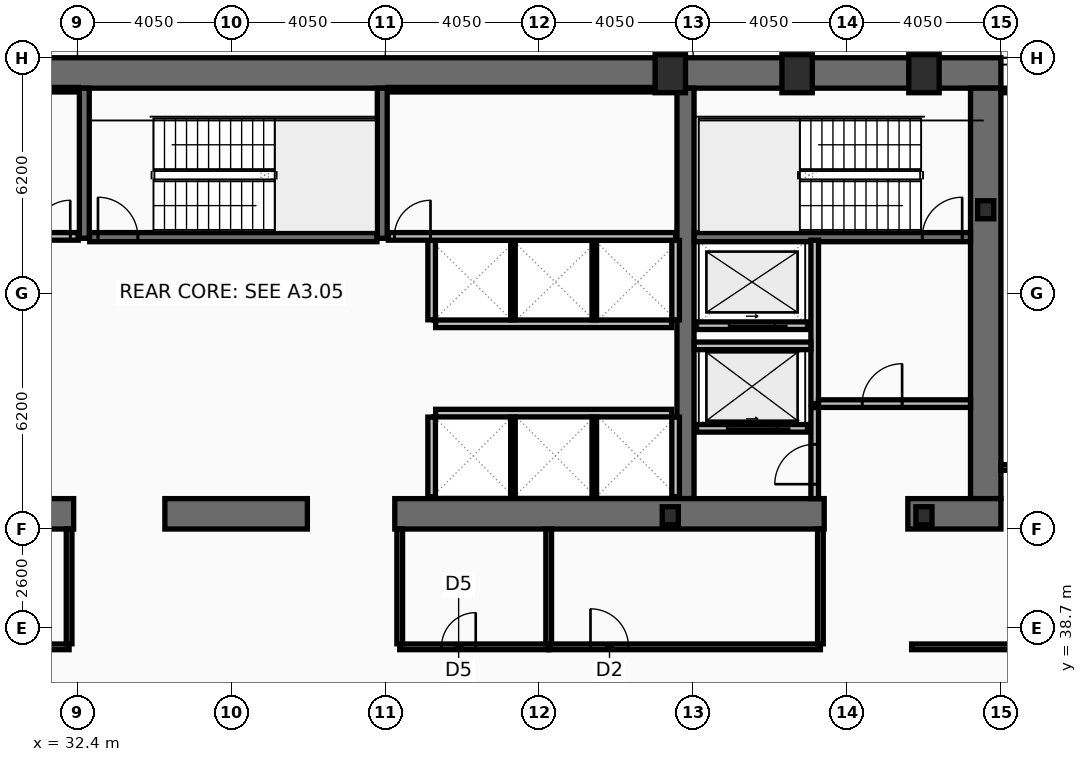
"""IFC4 building model, lengths in metres.
Left out: names, types, materials, properties, quantities, classifications, styles, units other than length and angle.
Written with IfcOpenShell. Run it as: python <this file> out.ifc"""

import sys

from ifc_helpers import new_model, si_unit, direction, frame, frame_2d, origin, origin_2d, place, context, subcontext, project, spatial, rectangle, hollow_rectangle, i_section, extrude, element, fill, save


model = new_model("IFC4")
c1 = context("Model", 3, precision=1e-05, world=origin(), true_north=direction((0.0, 1.0)))
c2 = subcontext(c1, "Body", "Model", "MODEL_VIEW")
j1 = project(units=[si_unit("LENGTHUNIT", "METRE"), si_unit("PLANEANGLEUNIT", "RADIAN")], contexts=[c1])
p1 = place(None, origin())
s1 = spatial("IfcSite", under=j1, at=p1, CompositionType="ELEMENT")
p2 = place(p1, origin())
s2 = spatial("IfcBuilding", under=s1, at=p2, CompositionType="ELEMENT")
p3 = place(p2, frame((0.0, 0.0, 33.8)))
s3 = spatial("IfcBuildingStorey", under=s2, at=p3, CompositionType="ELEMENT", Elevation=33.8)
p4 = place(p3, frame((16.2, 53.3, 0.0), z_axis=(0.0, 0.0, 1.0), x_axis=(1.0, 0.0, 0.0)))
e1 = element("IfcWall", 1, at=p4, inside=s3, PredefinedType="SHEAR", context=c2, shape_type="SweptSolid", body=[
    extrude(rectangle(XDim=40.5, YDim=0.8, at=frame_2d((20.25, 0.0))), origin(), (0.0, 0.0, 1.0), 3.82),
])
p5 = place(p3, frame((56.3, 52.9, 0.0), z_axis=(0.0, 0.0, 1.0), x_axis=(0.0, -1.0, 0.0)))
e2 = element("IfcWall", 2, at=p5, inside=s3, PredefinedType="SHEAR", context=c2, shape_type="SweptSolid", body=[
    extrude(rectangle(XDim=10.8, YDim=0.8, at=frame_2d((5.4, 0.0))), origin(), (0.0, 0.0, 1.0), 3.82),
])
p6 = place(p3, frame((48.4, 42.1, 0.0), z_axis=(0.0, 0.0, 1.0), x_axis=(0.0, 1.0, 0.0)))
e3 = element("IfcWall", 3, at=p6, inside=s3, PredefinedType="SHEAR", context=c2, shape_type="SweptSolid", body=[
    extrude(rectangle(XDim=10.8, YDim=0.45, at=frame_2d((5.4, 0.0))), origin(), (0.0, 0.0, 1.0), 3.82),
])
p7 = place(p3, frame((32.3, 41.7, 0.0), z_axis=(0.0, 0.0, 1.0), x_axis=(-1.0, 0.0, 0.0)))
e4 = element("IfcWall", 4, at=p7, inside=s3, PredefinedType="SHEAR", context=c2, shape_type="SweptSolid", body=[
    extrude(rectangle(XDim=11.45, YDim=0.8, at=frame_2d((5.725, 0.0))), origin(), (0.0, 0.0, 1.0), 3.82),
])
p8 = place(p3, frame((38.45, 41.7, 0.0), z_axis=(0.0, 0.0, 1.0), x_axis=(-1.0, 0.0, 0.0)))
e5 = element("IfcWall", 5, at=p8, inside=s3, PredefinedType="SHEAR", context=c2, shape_type="SweptSolid", body=[
    extrude(rectangle(XDim=3.75, YDim=0.8, at=frame_2d((1.875, 0.0))), origin(), (0.0, 0.0, 1.0), 3.82),
])
p9 = place(p3, frame((52.05, 41.7, 0.0), z_axis=(0.0, 0.0, 1.0), x_axis=(-1.0, 0.0, 0.0)))
e6 = element("IfcWall", 6, at=p9, inside=s3, PredefinedType="SHEAR", context=c2, shape_type="SweptSolid", body=[
    extrude(rectangle(XDim=11.3, YDim=0.8, at=frame_2d((5.65, 0.0))), origin(), (0.0, 0.0, 1.0), 3.82),
])
p10 = place(p3, frame((56.7, 41.7, 0.0), z_axis=(0.0, 0.0, 1.0), x_axis=(-1.0, 0.0, 0.0)))
e7 = element("IfcWall", 7, at=p10, inside=s3, PredefinedType="SHEAR", context=c2, shape_type="SweptSolid", body=[
    extrude(rectangle(XDim=2.45, YDim=0.8, at=frame_2d((1.225, 0.0))), origin(), (0.0, 0.0, 1.0), 3.82),
])
for number, where, z_axis, x_axis in (
    (8, (32.58, 48.95, 0.0), (0.0, 0.0, 1.0), (0.0, 1.0, 0.0)),
    (9, (40.42, 48.95, 0.0), (0.0, 0.0, 1.0), (0.0, 1.0, 0.0)),
):
    element("IfcWall", number, at=place(p3, frame(where, z_axis=z_axis, x_axis=x_axis)), inside=s3, PredefinedType="SHEAR", context=c2, shape_type="SweptSolid", body=[
        extrude(rectangle(XDim=3.95, YDim=0.26, at=frame_2d((1.975, 0.0))), origin(), (0.0, 0.0, 1.0), 3.82),
    ])
p11 = place(p3, frame((48.63, 48.98, 0.0), z_axis=(0.0, 0.0, 1.0), x_axis=(1.0, 0.0, 0.0)))
e10 = element("IfcWall", 10, at=p11, inside=s3, PredefinedType="SHEAR", context=c2, shape_type="SweptSolid", body=[
    extrude(rectangle(XDim=7.27, YDim=0.24, at=frame_2d((3.635, 0.0))), origin(), (0.0, 0.0, 1.0), 3.82),
])
p12 = place(p11, frame((6.0, 0.0, 0.0)))
e11 = element("IfcOpeningElement", 11, at=p12, cuts=e10, PredefinedType="OPENING", context=c2, shape_type="SweptSolid", body=[
    extrude(rectangle(XDim=1.05, YDim=2.15, at=frame_2d((0.525, 1.075))), frame((0.0, 0.13, 0.0), z_axis=(0.0, -1.0, 0.0), x_axis=(1.0, 0.0, 0.0)), (0.0, 0.0, 1.0), 0.26),
])
p13 = place(p3, frame((32.72, 48.98, 0.0), z_axis=(0.0, 0.0, 1.0), x_axis=(1.0, 0.0, 0.0)))
e12 = element("IfcWall", 12, at=p13, inside=s3, PredefinedType="SHEAR", context=c2, shape_type="SweptSolid", body=[
    extrude(rectangle(XDim=7.56, YDim=0.24, at=frame_2d((3.78, 0.0))), origin(), (0.0, 0.0, 1.0), 3.82),
])
p14 = place(p13, frame((0.22, 0.0, 0.0)))
e13 = element("IfcOpeningElement", 13, at=p14, cuts=e12, PredefinedType="OPENING", context=c2, shape_type="SweptSolid", body=[
    extrude(rectangle(XDim=1.05, YDim=2.15, at=frame_2d((0.525, 1.075))), frame((0.0, 0.13, 0.0), z_axis=(0.0, -1.0, 0.0), x_axis=(1.0, 0.0, 0.0)), (0.0, 0.0, 1.0), 0.26),
])
for number, where, z_axis, x_axis in (
    (14, (48.0, 53.28, 0.0), (0.0, 0.0, 1.0), (1.0, 0.0, 0.0)),
    (15, (51.337, 53.28, 0.0), (0.0, 0.0, 1.0), (1.0, 0.0, 0.0)),
    (16, (54.675, 53.28, 0.0), (0.0, 0.0, 1.0), (1.0, 0.0, 0.0)),
):
    element("IfcColumn", number, at=place(p3, frame(where, z_axis=z_axis, x_axis=x_axis)), inside=s3, PredefinedType="COLUMN", context=c2, shape_type="SweptSolid", body=[
        extrude(hollow_rectangle(XDim=0.8, YDim=1.0, WallThickness=0.055, at=origin_2d()), origin(), (0.0, 0.0, 1.0), 4.0),
    ])
for number, where, z_axis, x_axis in (
    (17, (56.3, 49.7, 0.0), (0.0, 0.0, 1.0), (1.0, 0.0, 0.0)),
    (18, (48.0, 41.65, 0.0), (0.0, 0.0, 1.0), (1.0, 0.0, 0.0)),
    (19, (54.675, 41.65, 0.0), (0.0, 0.0, 1.0), (1.0, 0.0, 0.0)),
):
    element("IfcColumn", number, at=place(p3, frame(where, z_axis=z_axis, x_axis=x_axis)), inside=s3, PredefinedType="COLUMN", context=c2, shape_type="SweptSolid", body=[
        extrude(i_section(OverallWidth=0.424, OverallDepth=0.474, WebThickness=0.048, FlangeThickness=0.077, at=origin_2d()), origin(), (0.0, 0.0, 1.0), 4.0),
    ])
p15 = place(p3, frame((51.61, 43.95, 0.0), z_axis=(0.0, 0.0, 1.0), x_axis=(-1.0, 0.0, 0.0)))
e20 = element("IfcWall", 20, at=p15, inside=s3, PredefinedType="PARTITIONING", context=c2, shape_type="SweptSolid", body=[
    extrude(rectangle(XDim=2.92, YDim=0.2, at=frame_2d((1.46, 0.0))), origin(), (0.0, 0.0, 1.0), 3.82),
])
p16 = place(p15, frame((0.81, 0.0, 0.0)))
e21 = element("IfcOpeningElement", 21, at=p16, cuts=e20, PredefinedType="OPENING", context=c2, shape_type="SweptSolid", body=[
    extrude(rectangle(XDim=1.3, YDim=2.18, at=frame_2d((0.65, 1.09))), frame((0.0, 0.11, 0.0), z_axis=(0.0, -1.0, 0.0), x_axis=(1.0, 0.0, 0.0)), (0.0, 0.0, 1.0), 0.22),
])
p17 = place(p3, frame((51.61, 46.65, 0.0), z_axis=(0.0, 0.0, 1.0), x_axis=(-1.0, 0.0, 0.0)))
e22 = element("IfcWall", 22, at=p17, inside=s3, PredefinedType="PARTITIONING", context=c2, shape_type="SweptSolid", body=[
    extrude(rectangle(XDim=2.92, YDim=0.2, at=frame_2d((1.46, 0.0))), origin(), (0.0, 0.0, 1.0), 3.82),
])
p18 = place(p17, frame((0.86, 0.0, 0.0)))
e23 = element("IfcOpeningElement", 23, at=p18, cuts=e22, PredefinedType="OPENING", context=c2, shape_type="SweptSolid", body=[
    extrude(rectangle(XDim=1.2, YDim=2.18, at=frame_2d((0.6, 1.09))), frame((0.0, 0.11, 0.0), z_axis=(0.0, -1.0, 0.0), x_axis=(1.0, 0.0, 0.0)), (0.0, 0.0, 1.0), 0.22),
])
p19 = place(p3, frame((51.8, 44.6, 0.0), z_axis=(0.0, 0.0, 1.0), x_axis=(0.0, 1.0, 0.0)))
e24 = element("IfcWall", 24, at=p19, inside=s3, PredefinedType="PARTITIONING", context=c2, shape_type="SweptSolid", body=[
    extrude(rectangle(XDim=4.3, YDim=0.2, at=frame_2d((2.15, 0.0))), origin(), (0.0, 0.0, 1.0), 3.82),
])
p20 = place(p3, frame((51.9, 44.6, 0.0), z_axis=(0.0, 0.0, 1.0), x_axis=(1.0, 0.0, 0.0)))
e25 = element("IfcWall", 25, at=p20, inside=s3, PredefinedType="PARTITIONING", context=c2, shape_type="SweptSolid", body=[
    extrude(rectangle(XDim=4.0, YDim=0.2, at=frame_2d((2.0, 0.0))), origin(), (0.0, 0.0, 1.0), 3.82),
])
p21 = place(p20, frame((1.15, 0.0, 0.0)))
e26 = element("IfcOpeningElement", 26, at=p21, cuts=e25, PredefinedType="OPENING", context=c2, shape_type="SweptSolid", body=[
    extrude(rectangle(XDim=1.05, YDim=2.15, at=frame_2d((0.525, 1.075))), frame((0.0, 0.11, 0.0), z_axis=(0.0, -1.0, 0.0), x_axis=(1.0, 0.0, 0.0)), (0.0, 0.0, 1.0), 0.22),
])
p22 = place(p3, frame((48.63, 46.12, 0.0), z_axis=(0.0, 0.0, 1.0), x_axis=(1.0, 0.0, 0.0)))
e27 = element("IfcWall", 27, at=p22, inside=s3, PredefinedType="PARTITIONING", context=c2, shape_type="SweptSolid", body=[
    extrude(rectangle(XDim=3.07, YDim=0.2, at=frame_2d((1.535, 0.0))), origin(), (0.0, 0.0, 1.0), 3.82),
])
p23 = place(p3, frame((51.8, 42.1, 0.0), z_axis=(0.0, 0.0, 1.0), x_axis=(0.0, 1.0, 0.0)))
e28 = element("IfcWall", 28, at=p23, inside=s3, PredefinedType="PARTITIONING", context=c2, shape_type="SweptSolid", body=[
    extrude(rectangle(XDim=2.395, YDim=0.2, at=frame_2d((1.198, 0.0))), origin(), (0.0, 0.0, 1.0), 3.82),
])
p24 = place(p23, frame((0.38, 0.0, 0.0)))
e29 = element("IfcOpeningElement", 29, at=p24, cuts=e28, PredefinedType="OPENING", context=c2, shape_type="SweptSolid", body=[
    extrude(rectangle(XDim=1.05, YDim=2.15, at=frame_2d((0.525, 1.075))), frame((0.0, 0.11, 0.0), z_axis=(0.0, -1.0, 0.0), x_axis=(1.0, 0.0, 0.0)), (0.0, 0.0, 1.0), 0.22),
])
p25 = place(p3, frame((41.825, 46.7, 0.0), z_axis=(0.0, 0.0, 1.0), x_axis=(1.0, 0.0, 0.0)))
e30 = element("IfcWall", 30, at=p25, inside=s3, PredefinedType="PARTITIONING", context=c2, shape_type="SweptSolid", body=[
    extrude(rectangle(XDim=6.21, YDim=0.2, at=frame_2d((3.105, 0.0))), origin(), (0.0, 0.0, 1.0), 3.82),
])
for number, where, z_axis, x_axis in (
    (31, (41.72, 46.805, 0.0), (0.0, 0.0, 1.0), (0.0, 1.0, 0.0)),
    (32, (48.14, 46.805, 0.0), (0.0, 0.0, 1.0), (0.0, 1.0, 0.0)),
):
    element("IfcWall", number, at=place(p3, frame(where, z_axis=z_axis, x_axis=x_axis)), inside=s3, PredefinedType="PARTITIONING", context=c2, shape_type="SweptSolid", body=[
        extrude(rectangle(XDim=2.09, YDim=0.2, at=frame_2d((1.045, 0.0))), origin(), (0.0, 0.0, 1.0), 3.82),
    ])
for number, where, z_axis, x_axis in (
    (33, (43.86, 46.805, 0.0), (0.0, 0.0, 1.0), (0.0, 1.0, 0.0)),
    (34, (46.0, 46.805, 0.0), (0.0, 0.0, 1.0), (0.0, 1.0, 0.0)),
):
    element("IfcWall", number, at=place(p3, frame(where, z_axis=z_axis, x_axis=x_axis)), inside=s3, PredefinedType="PARTITIONING", context=c2, shape_type="SweptSolid", body=[
        extrude(rectangle(XDim=2.09, YDim=0.12, at=frame_2d((1.045, 0.0))), origin(), (0.0, 0.0, 1.0), 3.82),
    ])
p26 = place(p3, frame((41.825, 44.35, 0.0), z_axis=(0.0, 0.0, 1.0), x_axis=(1.0, 0.0, 0.0)))
e35 = element("IfcWall", 35, at=p26, inside=s3, PredefinedType="PARTITIONING", context=c2, shape_type="SweptSolid", body=[
    extrude(rectangle(XDim=6.21, YDim=0.2, at=frame_2d((3.105, 0.0))), origin(), (0.0, 0.0, 1.0), 3.82),
])
for number, where, z_axis, x_axis in (
    (36, (41.72, 42.15, 0.0), (0.0, 0.0, 1.0), (0.0, 1.0, 0.0)),
    (37, (48.14, 42.15, 0.0), (0.0, 0.0, 1.0), (0.0, 1.0, 0.0)),
):
    element("IfcWall", number, at=place(p3, frame(where, z_axis=z_axis, x_axis=x_axis)), inside=s3, PredefinedType="PARTITIONING", context=c2, shape_type="SweptSolid", body=[
        extrude(rectangle(XDim=2.095, YDim=0.2, at=frame_2d((1.048, 0.0))), origin(), (0.0, 0.0, 1.0), 3.82),
    ])
for number, where, z_axis, x_axis in (
    (38, (43.86, 42.15, 0.0), (0.0, 0.0, 1.0), (0.0, 1.0, 0.0)),
    (39, (46.0, 42.15, 0.0), (0.0, 0.0, 1.0), (0.0, 1.0, 0.0)),
):
    element("IfcWall", number, at=place(p3, frame(where, z_axis=z_axis, x_axis=x_axis)), inside=s3, PredefinedType="PARTITIONING", context=c2, shape_type="SweptSolid", body=[
        extrude(rectangle(XDim=2.095, YDim=0.12, at=frame_2d((1.048, 0.0))), origin(), (0.0, 0.0, 1.0), 3.82),
    ])
p27 = place(p3, frame((24.7, 52.86, 0.0), z_axis=(0.0, 0.0, 1.0), x_axis=(1.0, 0.0, 0.0)))
e40 = element("IfcWall", 40, at=p27, inside=s3, PredefinedType="PARTITIONING", context=c2, shape_type="SweptSolid", body=[
    extrude(rectangle(XDim=7.72, YDim=0.12, at=frame_2d((3.86, 0.0))), origin(), (0.0, 0.0, 1.0), 3.82),
])
p28 = place(p3, frame((24.7, 49.0, 0.0), z_axis=(0.0, 0.0, 1.0), x_axis=(1.0, 0.0, 0.0)))
e41 = element("IfcWall", 41, at=p28, inside=s3, PredefinedType="PARTITIONING", context=c2, shape_type="SweptSolid", body=[
    extrude(rectangle(XDim=7.72, YDim=0.2, at=frame_2d((3.86, 0.0))), origin(), (0.0, 0.0, 1.0), 3.82),
])
p29 = place(p28, frame((6.56, 0.0, 0.0)))
e42 = element("IfcOpeningElement", 42, at=p29, cuts=e41, PredefinedType="OPENING", context=c2, shape_type="SweptSolid", body=[
    extrude(rectangle(XDim=0.95, YDim=2.1, at=frame_2d((0.475, 1.05))), frame((0.0, 0.11, 0.0), z_axis=(0.0, -1.0, 0.0), x_axis=(1.0, 0.0, 0.0)), (0.0, 0.0, 1.0), 0.22),
])
p30 = place(p3, frame((40.58, 52.86, 0.0), z_axis=(0.0, 0.0, 1.0), x_axis=(1.0, 0.0, 0.0)))
e43 = element("IfcWall", 43, at=p30, inside=s3, PredefinedType="PARTITIONING", context=c2, shape_type="SweptSolid", body=[
    extrude(rectangle(XDim=7.56, YDim=0.12, at=frame_2d((3.78, 0.0))), origin(), (0.0, 0.0, 1.0), 3.82),
])
p31 = place(p3, frame((40.58, 49.0, 0.0), z_axis=(0.0, 0.0, 1.0), x_axis=(1.0, 0.0, 0.0)))
e44 = element("IfcWall", 44, at=p31, inside=s3, PredefinedType="PARTITIONING", context=c2, shape_type="SweptSolid", body=[
    extrude(rectangle(XDim=7.56, YDim=0.2, at=frame_2d((3.78, 0.0))), origin(), (0.0, 0.0, 1.0), 3.82),
])
p32 = place(p31, frame((0.16, 0.0, 0.0)))
e45 = element("IfcOpeningElement", 45, at=p32, cuts=e44, PredefinedType="OPENING", context=c2, shape_type="SweptSolid", body=[
    extrude(rectangle(XDim=0.95, YDim=2.1, at=frame_2d((0.475, 1.05))), frame((0.0, 0.11, 0.0), z_axis=(0.0, -1.0, 0.0), x_axis=(1.0, 0.0, 0.0)), (0.0, 0.0, 1.0), 0.22),
])
p33 = place(p3, frame((28.4, 38.2, 0.0), z_axis=(0.0, 0.0, 1.0), x_axis=(1.0, 0.0, 0.0)))
e46 = element("IfcWall", 46, at=p33, inside=s3, PredefinedType="PARTITIONING", context=c2, shape_type="SweptSolid", body=[
    extrude(rectangle(XDim=3.78, YDim=0.15, at=frame_2d((1.89, 0.0))), origin(), (0.0, 0.0, 1.0), 3.01),
])
p34 = place(p33, frame((0.7, 0.0, 0.0)))
e47 = element("IfcOpeningElement", 47, at=p34, cuts=e46, PredefinedType="OPENING", context=c2, shape_type="SweptSolid", body=[
    extrude(rectangle(XDim=0.95, YDim=2.05, at=frame_2d((0.475, 1.025))), frame((0.0, 0.085, 0.0), z_axis=(0.0, -1.0, 0.0), x_axis=(1.0, 0.0, 0.0)), (0.0, 0.0, 1.0), 0.17),
])
p35 = place(p3, frame((32.18, 38.28, 0.0), z_axis=(0.0, 0.0, 1.0), x_axis=(0.0, 1.0, 0.0)))
e48 = element("IfcWall", 48, at=p35, inside=s3, PredefinedType="PARTITIONING", context=c2, shape_type="SweptSolid", body=[
    extrude(rectangle(XDim=3.02, YDim=0.15, at=frame_2d((1.51, 0.0))), origin(), (0.0, 0.0, 1.0), 3.82),
])
p36 = place(p3, frame((40.88, 38.2, 0.0), z_axis=(0.0, 0.0, 1.0), x_axis=(1.0, 0.0, 0.0)))
e49 = element("IfcWall", 49, at=p36, inside=s3, PredefinedType="PARTITIONING", context=c2, shape_type="SweptSolid", body=[
    extrude(rectangle(XDim=3.92, YDim=0.15, at=frame_2d((1.96, 0.0))), origin(), (0.0, 0.0, 1.0), 3.01),
])
p37 = place(p36, frame((1.1, 0.0, 0.0)))
e50 = element("IfcOpeningElement", 50, at=p37, cuts=e49, PredefinedType="OPENING", context=c2, shape_type="SweptSolid", body=[
    extrude(rectangle(XDim=0.9, YDim=2.05, at=frame_2d((0.45, 1.025))), frame((0.0, 0.085, 0.0), z_axis=(0.0, -1.0, 0.0), x_axis=(1.0, 0.0, 0.0)), (0.0, 0.0, 1.0), 0.17),
])
p38 = place(p3, frame((44.8, 38.2, 0.0), z_axis=(0.0, 0.0, 1.0), x_axis=(1.0, 0.0, 0.0)))
e51 = element("IfcWall", 51, at=p38, inside=s3, PredefinedType="PARTITIONING", context=c2, shape_type="SweptSolid", body=[
    extrude(rectangle(XDim=7.15, YDim=0.15, at=frame_2d((3.575, 0.0))), origin(), (0.0, 0.0, 1.0), 3.01),
])
p39 = place(p38, frame((1.1, 0.0, 0.0)))
e52 = element("IfcOpeningElement", 52, at=p39, cuts=e51, PredefinedType="OPENING", context=c2, shape_type="SweptSolid", body=[
    extrude(rectangle(XDim=1.0, YDim=2.05, at=frame_2d((0.5, 1.025))), frame((0.0, 0.085, 0.0), z_axis=(0.0, -1.0, 0.0), x_axis=(1.0, 0.0, 0.0)), (0.0, 0.0, 1.0), 0.17),
])
for number, where, z_axis, x_axis in (
    (53, (40.88, 38.28, 0.0), (0.0, 0.0, 1.0), (0.0, 1.0, 0.0)),
    (54, (44.8, 38.28, 0.0), (0.0, 0.0, 1.0), (0.0, 1.0, 0.0)),
    (55, (51.95, 38.28, 0.0), (0.0, 0.0, 1.0), (0.0, 1.0, 0.0)),
):
    element("IfcWall", number, at=place(p3, frame(where, z_axis=z_axis, x_axis=x_axis)), inside=s3, PredefinedType="PARTITIONING", context=c2, shape_type="SweptSolid", body=[
        extrude(rectangle(XDim=3.02, YDim=0.15, at=frame_2d((1.51, 0.0))), origin(), (0.0, 0.0, 1.0), 3.82),
    ])
p40 = place(p3, frame((54.35, 38.2, 0.0), z_axis=(0.0, 0.0, 1.0), x_axis=(1.0, 0.0, 0.0)))
e56 = element("IfcWall", 56, at=p40, inside=s3, PredefinedType="PARTITIONING", context=c2, shape_type="SweptSolid", body=[
    extrude(rectangle(XDim=16.52, YDim=0.15, at=frame_2d((8.26, 0.0))), origin(), (0.0, 0.0, 1.0), 3.01),
])
p41 = place(p40, frame((3.25, 0.0, 0.0)))
e57 = element("IfcOpeningElement", 57, at=p41, cuts=e56, PredefinedType="OPENING", context=c2, shape_type="SweptSolid", body=[
    extrude(rectangle(XDim=0.95, YDim=2.05, at=frame_2d((0.475, 1.025))), frame((0.0, 0.085, 0.0), z_axis=(0.0, -1.0, 0.0), x_axis=(1.0, 0.0, 0.0)), (0.0, 0.0, 1.0), 0.17),
])
p42 = place(p3, frame((56.7, 42.92, 0.0), z_axis=(0.0, 0.0, 1.0), x_axis=(1.0, 0.0, 0.0)))
e58 = element("IfcWall", 58, at=p42, inside=s3, PredefinedType="PARTITIONING", context=c2, shape_type="SweptSolid", body=[
    extrude(rectangle(XDim=14.105, YDim=0.15, at=frame_2d((7.052, 0.0))), origin(), (0.0, 0.0, 1.0), 3.01),
])
p43 = place(p42, frame((0.9, 0.0, 0.0)))
e59 = element("IfcOpeningElement", 59, at=p43, cuts=e58, PredefinedType="OPENING", context=c2, shape_type="SweptSolid", body=[
    extrude(rectangle(XDim=0.9, YDim=2.05, at=frame_2d((0.45, 1.025))), frame((0.0, 0.085, 0.0), z_axis=(0.0, -1.0, 0.0), x_axis=(1.0, 0.0, 0.0)), (0.0, 0.0, 1.0), 0.17),
])
p44 = place(p3, frame((56.7, 52.84, 0.0), z_axis=(0.0, 0.0, 1.0), x_axis=(1.0, 0.0, 0.0)))
e60 = element("IfcWall", 60, at=p44, inside=s3, PredefinedType="PARTITIONING", context=c2, shape_type="SweptSolid", body=[
    extrude(rectangle(XDim=14.105, YDim=0.12, at=frame_2d((7.052, 0.0))), origin(), (0.0, 0.0, 1.0), 3.82),
])
p45 = place(p12, origin())
e61 = element("IfcDoor", 61, at=p45, inside=s3, OperationType="SINGLE_SWING_RIGHT", PredefinedType="DOOR", context=c2, shape_type="SweptSolid", body=[
    extrude(rectangle(XDim=1.05, YDim=2.15, at=frame_2d((0.525, 1.075))), frame((0.0, 0.025, 0.0), z_axis=(0.0, -1.0, 0.0), x_axis=(1.0, 0.0, 0.0)), (0.0, 0.0, 1.0), 0.05),
])
fill(e11, e61)
p46 = place(p14, origin())
e62 = element("IfcDoor", 62, at=p46, inside=s3, OperationType="SINGLE_SWING_LEFT", PredefinedType="DOOR", context=c2, shape_type="SweptSolid", body=[
    extrude(rectangle(XDim=1.05, YDim=2.15, at=frame_2d((0.525, 1.075))), frame((0.0, 0.025, 0.0), z_axis=(0.0, -1.0, 0.0), x_axis=(1.0, 0.0, 0.0)), (0.0, 0.0, 1.0), 0.05),
])
fill(e13, e62)
p47 = place(p16, origin())
e63 = element("IfcDoor", 63, at=p47, inside=s3, OperationType="SLIDING_TO_LEFT", PredefinedType="DOOR", context=c2, shape_type="SweptSolid", body=[
    extrude(rectangle(XDim=1.3, YDim=2.18, at=frame_2d((0.65, 1.09))), frame((0.0, 0.025, 0.0), z_axis=(0.0, -1.0, 0.0), x_axis=(1.0, 0.0, 0.0)), (0.0, 0.0, 1.0), 0.05),
])
fill(e21, e63)
p48 = place(p18, origin())
e64 = element("IfcDoor", 64, at=p48, inside=s3, OperationType="SLIDING_TO_LEFT", PredefinedType="DOOR", context=c2, shape_type="SweptSolid", body=[
    extrude(rectangle(XDim=1.2, YDim=2.18, at=frame_2d((0.6, 1.09))), frame((0.0, 0.025, 0.0), z_axis=(0.0, -1.0, 0.0), x_axis=(1.0, 0.0, 0.0)), (0.0, 0.0, 1.0), 0.05),
])
fill(e23, e64)
p49 = place(p21, origin())
e65 = element("IfcDoor", 65, at=p49, inside=s3, OperationType="SINGLE_SWING_RIGHT", PredefinedType="DOOR", context=c2, shape_type="SweptSolid", body=[
    extrude(rectangle(XDim=1.05, YDim=2.15, at=frame_2d((0.525, 1.075))), frame((0.0, 0.025, 0.0), z_axis=(0.0, -1.0, 0.0), x_axis=(1.0, 0.0, 0.0)), (0.0, 0.0, 1.0), 0.05),
])
fill(e26, e65)
p50 = place(p24, origin())
e66 = element("IfcDoor", 66, at=p50, inside=s3, OperationType="SINGLE_SWING_LEFT", PredefinedType="DOOR", context=c2, shape_type="SweptSolid", body=[
    extrude(rectangle(XDim=1.05, YDim=2.15, at=frame_2d((0.525, 1.075))), frame((0.0, 0.025, 0.0), z_axis=(0.0, -1.0, 0.0), x_axis=(1.0, 0.0, 0.0)), (0.0, 0.0, 1.0), 0.05),
])
fill(e29, e66)
p51 = place(p29, origin())
e67 = element("IfcDoor", 67, at=p51, inside=s3, OperationType="SINGLE_SWING_RIGHT", PredefinedType="DOOR", context=c2, shape_type="SweptSolid", body=[
    extrude(rectangle(XDim=0.95, YDim=2.1, at=frame_2d((0.475, 1.05))), frame((0.0, 0.025, 0.0), z_axis=(0.0, -1.0, 0.0), x_axis=(1.0, 0.0, 0.0)), (0.0, 0.0, 1.0), 0.05),
])
fill(e42, e67)
p52 = place(p32, origin())
e68 = element("IfcDoor", 68, at=p52, inside=s3, OperationType="SINGLE_SWING_RIGHT", PredefinedType="DOOR", context=c2, shape_type="SweptSolid", body=[
    extrude(rectangle(XDim=0.95, YDim=2.1, at=frame_2d((0.475, 1.05))), frame((0.0, 0.025, 0.0), z_axis=(0.0, -1.0, 0.0), x_axis=(1.0, 0.0, 0.0)), (0.0, 0.0, 1.0), 0.05),
])
fill(e45, e68)
p53 = place(p37, origin())
e69 = element("IfcDoor", 69, at=p53, inside=s3, OperationType="SINGLE_SWING_RIGHT", PredefinedType="DOOR", context=c2, shape_type="SweptSolid", body=[
    extrude(rectangle(XDim=0.9, YDim=2.05, at=frame_2d((0.45, 1.025))), frame((0.0, 0.025, 0.0), z_axis=(0.0, -1.0, 0.0), x_axis=(1.0, 0.0, 0.0)), (0.0, 0.0, 1.0), 0.05),
])
fill(e50, e69)
p54 = place(p39, origin())
e70 = element("IfcDoor", 70, at=p54, inside=s3, OperationType="SINGLE_SWING_LEFT", PredefinedType="DOOR", context=c2, shape_type="SweptSolid", body=[
    extrude(rectangle(XDim=1.0, YDim=2.05, at=frame_2d((0.5, 1.025))), frame((0.0, 0.025, 0.0), z_axis=(0.0, -1.0, 0.0), x_axis=(1.0, 0.0, 0.0)), (0.0, 0.0, 1.0), 0.05),
])
fill(e52, e70)
save(model, sys.argv[1])
